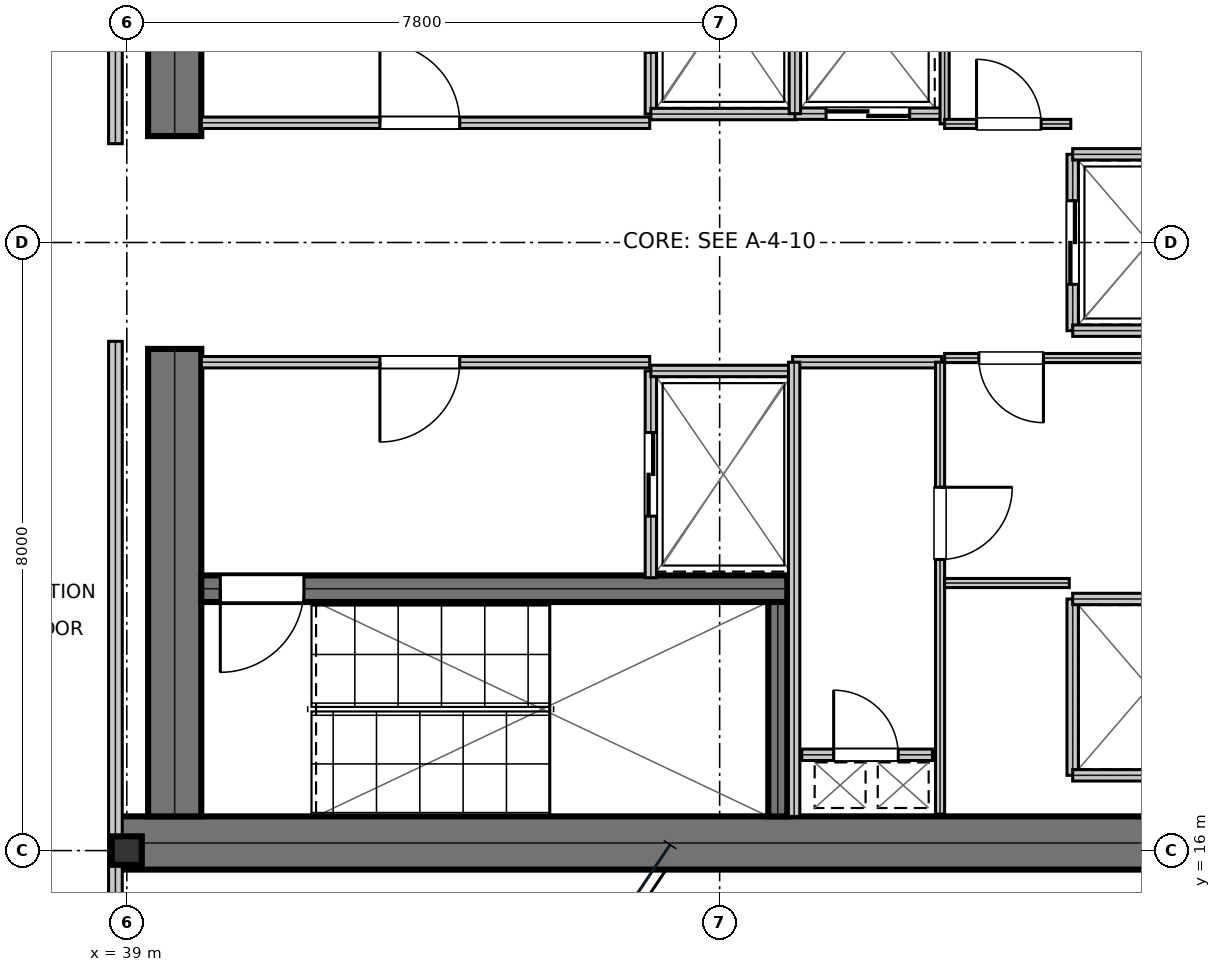
"""IFC4 building model, lengths in metres.
Left out: names, types, materials, properties, quantities, classifications, styles, units other than length and angle.
Written with IfcOpenShell. Run it as: python <this file> out.ifc"""

import sys

from ifc_helpers import new_model, si_unit, direction, frame, frame_2d, origin, origin_2d, place, context, subcontext, project, spatial, rectangle, i_section, extrude, element, fill, save


model = new_model("IFC4")
c1 = context("Model", 3, precision=1e-05, world=origin(), true_north=direction((0.0, 1.0)))
c2 = subcontext(c1, "Body", "Model", "MODEL_VIEW")
j1 = project(units=[si_unit("LENGTHUNIT", "METRE"), si_unit("PLANEANGLEUNIT", "RADIAN")], contexts=[c1])
p1 = place(None, origin())
s1 = spatial("IfcSite", under=j1, at=p1, CompositionType="ELEMENT")
p2 = place(p1, origin())
s2 = spatial("IfcBuilding", under=s1, at=p2, CompositionType="ELEMENT")
p3 = place(p2, frame((0.0, 0.0, 208.05)))
s3 = spatial("IfcBuildingStorey", under=s2, at=p3, CompositionType="ELEMENT", Elevation=208.05)
p4 = place(p3, frame((38.8, 16.1, 0.0), z_axis=(0.0, 0.0, 1.0), x_axis=(1.0, 0.0, 0.0)))
e1 = element("IfcWall", 1, at=p4, inside=s3, PredefinedType="SHEAR", context=c2, shape_type="SweptSolid", body=[
    extrude(rectangle(XDim=16.0, YDim=0.7, at=frame_2d((8.0, 0.0))), origin(), (0.0, 0.0, 1.0), 3.79),
])
for number, where, z_axis, x_axis in (
    (2, (39.63, 16.45, 0.0), (0.0, 0.0, 1.0), (0.0, 1.0, 0.0)),
    (3, (39.63, 25.4, 0.0), (0.0, 0.0, 1.0), (0.0, 1.0, 0.0)),
):
    element("IfcWall", number, at=place(p3, frame(where, z_axis=z_axis, x_axis=x_axis)), inside=s3, PredefinedType="SHEAR", context=c2, shape_type="SweptSolid", body=[
        extrude(rectangle(XDim=6.15, YDim=0.7, at=frame_2d((3.075, 0.0))), origin(), (0.0, 0.0, 1.0), 3.79),
    ])
p5 = place(p3, frame((39.98, 19.445, 0.0), z_axis=(0.0, 0.0, 1.0), x_axis=(1.0, 0.0, 0.0)))
e4 = element("IfcWall", 4, at=p5, inside=s3, PredefinedType="SHEAR", context=c2, shape_type="SweptSolid", body=[
    extrude(rectangle(XDim=7.71, YDim=0.35, at=frame_2d((3.855, 0.0))), origin(), (0.0, 0.0, 1.0), 3.79),
])
p6 = place(p5, frame((0.25, 0.0, 0.0)))
e5 = element("IfcOpeningElement", 5, at=p6, cuts=e4, PredefinedType="OPENING", context=c2, shape_type="SweptSolid", body=[
    extrude(rectangle(XDim=1.1, YDim=2.15, at=frame_2d((0.55, 1.075))), frame((0.0, 0.185, 0.0), z_axis=(0.0, -1.0, 0.0), x_axis=(1.0, 0.0, 0.0)), (0.0, 0.0, 1.0), 0.37),
])
p7 = place(p3, frame((47.565, 16.45, 0.0), z_axis=(0.0, 0.0, 1.0), x_axis=(0.0, 1.0, 0.0)))
e6 = element("IfcWall", 6, at=p7, inside=s3, PredefinedType="SHEAR", context=c2, shape_type="SweptSolid", body=[
    extrude(rectangle(XDim=2.82, YDim=0.25, at=frame_2d((1.41, 0.0))), origin(), (0.0, 0.0, 1.0), 3.79),
])
p8 = place(p3, frame((39.0, 16.0, 0.0), z_axis=(0.0, 0.0, 1.0), x_axis=(1.0, 0.0, 0.0)))
e7 = element("IfcColumn", 7, at=p8, inside=s3, PredefinedType="COLUMN", context=c2, shape_type="SweptSolid", body=[
    extrude(i_section(OverallWidth=0.394, OverallDepth=0.375, WebThickness=0.017, FlangeThickness=0.028, at=origin_2d()), origin(), (0.0, 0.0, 1.0), 4.044),
])
p9 = place(p3, frame((39.98, 25.575, 0.0), z_axis=(0.0, 0.0, 1.0), x_axis=(1.0, 0.0, 0.0)))
e8 = element("IfcWall", 8, at=p9, inside=s3, PredefinedType="PARTITIONING", context=c2, shape_type="SweptSolid", body=[
    extrude(rectangle(XDim=5.9, YDim=0.15, at=frame_2d((2.95, 0.0))), origin(), (0.0, 0.0, 1.0), 3.79),
])
p10 = place(p9, frame((2.35, 0.0, 0.0)))
e9 = element("IfcOpeningElement", 9, at=p10, cuts=e8, PredefinedType="OPENING", context=c2, shape_type="SweptSolid", body=[
    extrude(rectangle(XDim=1.05, YDim=2.15, at=frame_2d((0.525, 1.075))), frame((0.0, 0.085, 0.0), z_axis=(0.0, -1.0, 0.0), x_axis=(1.0, 0.0, 0.0)), (0.0, 0.0, 1.0), 0.17),
])
p11 = place(p3, frame((39.98, 22.425, 0.0), z_axis=(0.0, 0.0, 1.0), x_axis=(1.0, 0.0, 0.0)))
e10 = element("IfcWall", 10, at=p11, inside=s3, PredefinedType="PARTITIONING", context=c2, shape_type="SweptSolid", body=[
    extrude(rectangle(XDim=5.9, YDim=0.15, at=frame_2d((2.95, 0.0))), origin(), (0.0, 0.0, 1.0), 3.79),
])
p12 = place(p11, frame((2.35, 0.0, 0.0)))
e11 = element("IfcOpeningElement", 11, at=p12, cuts=e10, PredefinedType="OPENING", context=c2, shape_type="SweptSolid", body=[
    extrude(rectangle(XDim=1.05, YDim=2.15, at=frame_2d((0.525, 1.075))), frame((0.0, 0.085, 0.0), z_axis=(0.0, -1.0, 0.0), x_axis=(1.0, 0.0, 0.0)), (0.0, 0.0, 1.0), 0.17),
])
p13 = place(p3, frame((45.895, 25.69, 0.0), z_axis=(0.0, 0.0, 1.0), x_axis=(0.0, 1.0, 0.0)))
e12 = element("IfcWall", 12, at=p13, inside=s3, PredefinedType="PARTITIONING", context=c2, shape_type="SweptSolid", body=[
    extrude(rectangle(XDim=2.72, YDim=0.15, at=frame_2d((1.36, 0.0))), origin(), (0.0, 0.0, 1.0), 3.79),
])
p14 = place(p13, frame((0.81, 0.0, 0.0)))
e13 = element("IfcOpeningElement", 13, at=p14, cuts=e12, PredefinedType="OPENING", context=c2, shape_type="SweptSolid", body=[
    extrude(rectangle(XDim=1.1, YDim=2.15, at=frame_2d((0.55, 1.075))), frame((0.0, 0.085, 0.0), z_axis=(0.0, -1.0, 0.0), x_axis=(1.0, 0.0, 0.0)), (0.0, 0.0, 1.0), 0.17),
])
p15 = place(p3, frame((45.895, 25.69, 0.0), z_axis=(0.0, 0.0, 1.0), x_axis=(1.0, 0.0, 0.0)))
e14 = element("IfcWall", 14, at=p15, inside=s3, PredefinedType="PARTITIONING", context=c2, shape_type="SweptSolid", body=[
    extrude(rectangle(XDim=1.915, YDim=0.15, at=frame_2d((0.958, 0.0))), origin(), (0.0, 0.0, 1.0), 3.79),
])
p16 = place(p3, frame((45.895, 19.59, 0.0), z_axis=(0.0, 0.0, 1.0), x_axis=(0.0, 1.0, 0.0)))
e15 = element("IfcWall", 15, at=p16, inside=s3, PredefinedType="PARTITIONING", context=c2, shape_type="SweptSolid", body=[
    extrude(rectangle(XDim=2.72, YDim=0.15, at=frame_2d((1.36, 0.0))), origin(), (0.0, 0.0, 1.0), 3.79),
])
p17 = place(p16, frame((0.81, 0.0, 0.0)))
e16 = element("IfcOpeningElement", 16, at=p17, cuts=e15, PredefinedType="OPENING", context=c2, shape_type="SweptSolid", body=[
    extrude(rectangle(XDim=1.1, YDim=2.15, at=frame_2d((0.55, 1.075))), frame((0.0, 0.085, 0.0), z_axis=(0.0, -1.0, 0.0), x_axis=(1.0, 0.0, 0.0)), (0.0, 0.0, 1.0), 0.17),
])
p18 = place(p3, frame((45.895, 22.31, 0.0), z_axis=(0.0, 0.0, 1.0), x_axis=(1.0, 0.0, 0.0)))
e17 = element("IfcWall", 17, at=p18, inside=s3, PredefinedType="PARTITIONING", context=c2, shape_type="SweptSolid", body=[
    extrude(rectangle(XDim=1.915, YDim=0.15, at=frame_2d((0.958, 0.0))), origin(), (0.0, 0.0, 1.0), 3.79),
])
p19 = place(p3, frame((47.79, 25.695, 0.0), z_axis=(0.0, 0.0, 1.0), x_axis=(1.0, 0.0, 0.0)))
e18 = element("IfcWall", 18, at=p19, inside=s3, PredefinedType="PARTITIONING", context=c2, shape_type="SweptSolid", body=[
    extrude(rectangle(XDim=1.92, YDim=0.15, at=frame_2d((0.96, 0.0))), origin(), (0.0, 0.0, 1.0), 3.79),
])
p20 = place(p19, frame((0.41, 0.0, 0.0)))
e19 = element("IfcOpeningElement", 19, at=p20, cuts=e18, PredefinedType="OPENING", context=c2, shape_type="SweptSolid", body=[
    extrude(rectangle(XDim=1.1, YDim=2.15, at=frame_2d((0.55, 1.075))), frame((0.0, 0.085, 0.0), z_axis=(0.0, -1.0, 0.0), x_axis=(1.0, 0.0, 0.0)), (0.0, 0.0, 1.0), 0.17),
])
p21 = place(p3, frame((47.79, 25.695, 0.0), z_axis=(0.0, 0.0, 1.0), x_axis=(0.0, 1.0, 0.0)))
e20 = element("IfcWall", 20, at=p21, inside=s3, PredefinedType="PARTITIONING", context=c2, shape_type="SweptSolid", body=[
    extrude(rectangle(XDim=2.415, YDim=0.15, at=frame_2d((1.208, 0.0))), origin(), (0.0, 0.0, 1.0), 3.79),
])
p22 = place(p3, frame((51.445, 22.84, 0.0), z_axis=(0.0, 0.0, 1.0), x_axis=(0.0, 1.0, 0.0)))
e21 = element("IfcWall", 21, at=p22, inside=s3, PredefinedType="PARTITIONING", context=c2, shape_type="SweptSolid", body=[
    extrude(rectangle(XDim=2.32, YDim=0.15, at=frame_2d((1.16, 0.0))), origin(), (0.0, 0.0, 1.0), 3.79),
])
p23 = place(p22, frame((0.61, 0.0, 0.0)))
e22 = element("IfcOpeningElement", 22, at=p23, cuts=e21, PredefinedType="OPENING", context=c2, shape_type="SweptSolid", body=[
    extrude(rectangle(XDim=1.1, YDim=2.15, at=frame_2d((0.55, 1.075))), frame((0.0, 0.085, 0.0), z_axis=(0.0, -1.0, 0.0), x_axis=(1.0, 0.0, 0.0)), (0.0, 0.0, 1.0), 0.17),
])
for number, where, z_axis, x_axis in (
    (23, (51.445, 22.84, 0.0), (0.0, 0.0, 1.0), (1.0, 0.0, 0.0)),
    (24, (51.445, 25.16, 0.0), (0.0, 0.0, 1.0), (1.0, 0.0, 0.0)),
):
    element("IfcWall", number, at=place(p3, frame(where, z_axis=z_axis, x_axis=x_axis)), inside=s3, PredefinedType="PARTITIONING", context=c2, shape_type="SweptSolid", body=[
        extrude(rectangle(XDim=2.015, YDim=0.15, at=frame_2d((1.007, 0.0))), origin(), (0.0, 0.0, 1.0), 3.79),
    ])
p24 = place(p3, frame((51.445, 16.99, 0.0), z_axis=(0.0, 0.0, 1.0), x_axis=(0.0, 1.0, 0.0)))
e25 = element("IfcWall", 25, at=p24, inside=s3, PredefinedType="PARTITIONING", context=c2, shape_type="SweptSolid", body=[
    extrude(rectangle(XDim=2.32, YDim=0.15, at=frame_2d((1.16, 0.0))), origin(), (0.0, 0.0, 1.0), 3.79),
])
for number, where, z_axis, x_axis in (
    (26, (51.445, 16.99, 0.0), (0.0, 0.0, 1.0), (1.0, 0.0, 0.0)),
    (27, (51.445, 19.31, 0.0), (0.0, 0.0, 1.0), (1.0, 0.0, 0.0)),
):
    element("IfcWall", number, at=place(p3, frame(where, z_axis=z_axis, x_axis=x_axis)), inside=s3, PredefinedType="PARTITIONING", context=c2, shape_type="SweptSolid", body=[
        extrude(rectangle(XDim=2.015, YDim=0.15, at=frame_2d((1.007, 0.0))), origin(), (0.0, 0.0, 1.0), 3.79),
    ])
p25 = place(p3, frame((47.88, 17.26, 0.0), z_axis=(0.0, 0.0, 1.0), x_axis=(1.0, 0.0, 0.0)))
e28 = element("IfcWall", 28, at=p25, inside=s3, PredefinedType="PARTITIONING", context=c2, shape_type="SweptSolid", body=[
    extrude(rectangle(XDim=1.72, YDim=0.15, at=frame_2d((0.86, 0.0))), origin(), (0.0, 0.0, 1.0), 3.79),
])
p26 = place(p25, frame((0.42, 0.0, 0.0)))
e29 = element("IfcOpeningElement", 29, at=p26, cuts=e28, PredefinedType="OPENING", context=c2, shape_type="SweptSolid", body=[
    extrude(rectangle(XDim=0.85, YDim=2.15, at=frame_2d((0.425, 1.075))), frame((0.0, 0.085, 0.0), z_axis=(0.0, -1.0, 0.0), x_axis=(1.0, 0.0, 0.0)), (0.0, 0.0, 1.0), 0.17),
])
p27 = place(p3, frame((47.76, 22.425, 0.0), z_axis=(0.0, 0.0, 1.0), x_axis=(1.0, 0.0, 0.0)))
e30 = element("IfcWall", 30, at=p27, inside=s3, PredefinedType="PARTITIONING", context=c2, shape_type="SweptSolid", body=[
    extrude(rectangle(XDim=1.96, YDim=0.15, at=frame_2d((0.98, 0.0))), origin(), (0.0, 0.0, 1.0), 3.79),
])
p28 = place(p3, frame((47.78, 16.45, 0.0), z_axis=(0.0, 0.0, 1.0), x_axis=(0.0, 1.0, 0.0)))
e31 = element("IfcWall", 31, at=p28, inside=s3, PredefinedType="PARTITIONING", context=c2, shape_type="SweptSolid", body=[
    extrude(rectangle(XDim=5.975, YDim=0.15, at=frame_2d((2.988, 0.0))), origin(), (0.0, 0.0, 1.0), 3.79),
])
p29 = place(p3, frame((49.7, 16.48, 0.0), z_axis=(0.0, 0.0, 1.0), x_axis=(0.0, 1.0, 0.0)))
e32 = element("IfcWall", 32, at=p29, inside=s3, PredefinedType="PARTITIONING", context=c2, shape_type="SweptSolid", body=[
    extrude(rectangle(XDim=5.945, YDim=0.12, at=frame_2d((2.973, 0.0))), origin(), (0.0, 0.0, 1.0), 3.79),
])
p30 = place(p29, frame((3.35, 0.0, 0.0)))
e33 = element("IfcOpeningElement", 33, at=p30, cuts=e32, PredefinedType="OPENING", context=c2, shape_type="SweptSolid", body=[
    extrude(rectangle(XDim=0.95, YDim=2.15, at=frame_2d((0.475, 1.075))), frame((0.0, 0.07, 0.0), z_axis=(0.0, -1.0, 0.0), x_axis=(1.0, 0.0, 0.0)), (0.0, 0.0, 1.0), 0.14),
])
p31 = place(p3, frame((49.76, 22.48, 0.0), z_axis=(0.0, 0.0, 1.0), x_axis=(1.0, 0.0, 0.0)))
e34 = element("IfcWall", 34, at=p31, inside=s3, PredefinedType="PARTITIONING", context=c2, shape_type="SweptSolid", body=[
    extrude(rectangle(XDim=3.9, YDim=0.12, at=frame_2d((1.95, 0.0))), origin(), (0.0, 0.0, 1.0), 3.79),
])
p32 = place(p31, frame((0.45, 0.0, 0.0)))
e35 = element("IfcOpeningElement", 35, at=p32, cuts=e34, PredefinedType="OPENING", context=c2, shape_type="SweptSolid", body=[
    extrude(rectangle(XDim=0.85, YDim=2.15, at=frame_2d((0.425, 1.075))), frame((0.0, 0.07, 0.0), z_axis=(0.0, -1.0, 0.0), x_axis=(1.0, 0.0, 0.0)), (0.0, 0.0, 1.0), 0.14),
])
p33 = place(p3, frame((49.76, 19.52, 0.0), z_axis=(0.0, 0.0, 1.0), x_axis=(1.0, 0.0, 0.0)))
e36 = element("IfcWall", 36, at=p33, inside=s3, PredefinedType="PARTITIONING", context=c2, shape_type="SweptSolid", body=[
    extrude(rectangle(XDim=1.64, YDim=0.12, at=frame_2d((0.82, 0.0))), origin(), (0.0, 0.0, 1.0), 3.79),
])
p34 = place(p3, frame((49.76, 25.56, 0.0), z_axis=(0.0, 0.0, 1.0), x_axis=(0.0, 1.0, 0.0)))
e37 = element("IfcWall", 37, at=p34, inside=s3, PredefinedType="PARTITIONING", context=c2, shape_type="SweptSolid", body=[
    extrude(rectangle(XDim=2.66, YDim=0.12, at=frame_2d((1.33, 0.0))), origin(), (0.0, 0.0, 1.0), 3.79),
])
p35 = place(p3, frame((49.76, 25.56, 0.0), z_axis=(0.0, 0.0, 1.0), x_axis=(1.0, 0.0, 0.0)))
e38 = element("IfcWall", 38, at=p35, inside=s3, PredefinedType="PARTITIONING", context=c2, shape_type="SweptSolid", body=[
    extrude(rectangle(XDim=1.66, YDim=0.12, at=frame_2d((0.83, 0.0))), origin(), (0.0, 0.0, 1.0), 3.79),
])
p36 = place(p35, frame((0.42, 0.0, 0.0)))
e39 = element("IfcOpeningElement", 39, at=p36, cuts=e38, PredefinedType="OPENING", context=c2, shape_type="SweptSolid", body=[
    extrude(rectangle(XDim=0.85, YDim=2.15, at=frame_2d((0.425, 1.075))), frame((0.0, 0.07, 0.0), z_axis=(0.0, -1.0, 0.0), x_axis=(1.0, 0.0, 0.0)), (0.0, 0.0, 1.0), 0.14),
])
p37 = place(p3, frame((38.85, 14.5, 0.0), z_axis=(0.0, 0.0, 1.0), x_axis=(0.0, 1.0, 0.0)))
e40 = element("IfcWall", 40, at=p37, inside=s3, PredefinedType="SOLIDWALL", context=c2, shape_type="SweptSolid", body=[
    extrude(rectangle(XDim=8.2, YDim=0.18, at=frame_2d((4.1, 0.0))), origin(), (0.0, 0.0, 1.0), 3.241),
])
p38 = place(p3, frame((38.85, 25.3, 0.0), z_axis=(0.0, 0.0, 1.0), x_axis=(0.0, 1.0, 0.0)))
e41 = element("IfcWall", 41, at=p38, inside=s3, PredefinedType="SOLIDWALL", context=c2, shape_type="SweptSolid", body=[
    extrude(rectangle(XDim=8.198, YDim=0.18, at=frame_2d((4.099, 0.0))), origin(), (0.0, 0.0, 1.0), 3.241),
])
p39 = place(p10, origin())
e42 = element("IfcDoor", 42, at=p39, inside=s3, OperationType="SINGLE_SWING_LEFT", PredefinedType="DOOR", context=c2, shape_type="SweptSolid", body=[
    extrude(rectangle(XDim=1.05, YDim=2.15, at=frame_2d((0.525, 1.075))), frame((0.0, 0.025, 0.0), z_axis=(0.0, -1.0, 0.0), x_axis=(1.0, 0.0, 0.0)), (0.0, 0.0, 1.0), 0.05),
])
fill(e9, e42)
p40 = place(p12, frame((1.05, 0.0, 0.0), z_axis=(0.0, 0.0, 1.0), x_axis=(-1.0, 0.0, 0.0)))
e43 = element("IfcDoor", 43, at=p40, inside=s3, OperationType="SINGLE_SWING_RIGHT", PredefinedType="DOOR", context=c2, shape_type="SweptSolid", body=[
    extrude(rectangle(XDim=1.05, YDim=2.15, at=frame_2d((0.525, 1.075))), frame((0.0, 0.025, 0.0), z_axis=(0.0, -1.0, 0.0), x_axis=(1.0, 0.0, 0.0)), (0.0, 0.0, 1.0), 0.05),
])
fill(e11, e43)
p41 = place(p17, frame((1.1, 0.0, 0.0), z_axis=(0.0, 0.0, 1.0), x_axis=(-1.0, 0.0, 0.0)))
e44 = element("IfcDoor", 44, at=p41, inside=s3, OperationType="DOUBLE_DOOR_SLIDING", PredefinedType="DOOR", context=c2, shape_type="SweptSolid", body=[
    extrude(rectangle(XDim=1.1, YDim=2.15, at=frame_2d((0.55, 1.075))), frame((0.0, 0.025, 0.0), z_axis=(0.0, -1.0, 0.0), x_axis=(1.0, 0.0, 0.0)), (0.0, 0.0, 1.0), 0.05),
])
fill(e16, e44)
p42 = place(p20, frame((1.1, 0.0, 0.0), z_axis=(0.0, 0.0, 1.0), x_axis=(-1.0, 0.0, 0.0)))
e45 = element("IfcDoor", 45, at=p42, inside=s3, OperationType="DOUBLE_DOOR_SLIDING", PredefinedType="DOOR", context=c2, shape_type="SweptSolid", body=[
    extrude(rectangle(XDim=1.1, YDim=2.15, at=frame_2d((0.55, 1.075))), frame((0.0, 0.025, 0.0), z_axis=(0.0, -1.0, 0.0), x_axis=(1.0, 0.0, 0.0)), (0.0, 0.0, 1.0), 0.05),
])
fill(e19, e45)
p43 = place(p23, frame((1.1, 0.0, 0.0), z_axis=(0.0, 0.0, 1.0), x_axis=(-1.0, 0.0, 0.0)))
e46 = element("IfcDoor", 46, at=p43, inside=s3, OperationType="DOUBLE_DOOR_SLIDING", PredefinedType="DOOR", context=c2, shape_type="SweptSolid", body=[
    extrude(rectangle(XDim=1.1, YDim=2.15, at=frame_2d((0.55, 1.075))), frame((0.0, 0.025, 0.0), z_axis=(0.0, -1.0, 0.0), x_axis=(1.0, 0.0, 0.0)), (0.0, 0.0, 1.0), 0.05),
])
fill(e22, e46)
p44 = place(p26, origin())
e47 = element("IfcDoor", 47, at=p44, inside=s3, OperationType="SINGLE_SWING_LEFT", PredefinedType="TRAPDOOR", context=c2, shape_type="SweptSolid", body=[
    extrude(rectangle(XDim=0.85, YDim=2.15, at=frame_2d((0.425, 1.075))), frame((0.0, 0.025, 0.0), z_axis=(0.0, -1.0, 0.0), x_axis=(1.0, 0.0, 0.0)), (0.0, 0.0, 1.0), 0.05),
])
fill(e29, e47)
p45 = place(p30, frame((0.95, 0.0, 0.0), z_axis=(0.0, 0.0, 1.0), x_axis=(-1.0, 0.0, 0.0)))
e48 = element("IfcDoor", 48, at=p45, inside=s3, OperationType="SINGLE_SWING_LEFT", PredefinedType="DOOR", context=c2, shape_type="SweptSolid", body=[
    extrude(rectangle(XDim=0.95, YDim=2.15, at=frame_2d((0.475, 1.075))), frame((0.0, 0.025, 0.0), z_axis=(0.0, -1.0, 0.0), x_axis=(1.0, 0.0, 0.0)), (0.0, 0.0, 1.0), 0.05),
])
fill(e33, e48)
p46 = place(p32, frame((0.85, 0.0, 0.0), z_axis=(0.0, 0.0, 1.0), x_axis=(-1.0, 0.0, 0.0)))
e49 = element("IfcDoor", 49, at=p46, inside=s3, OperationType="SINGLE_SWING_LEFT", PredefinedType="DOOR", context=c2, shape_type="SweptSolid", body=[
    extrude(rectangle(XDim=0.85, YDim=2.15, at=frame_2d((0.425, 1.075))), frame((0.0, 0.025, 0.0), z_axis=(0.0, -1.0, 0.0), x_axis=(1.0, 0.0, 0.0)), (0.0, 0.0, 1.0), 0.05),
])
fill(e35, e49)
p47 = place(p36, origin())
e50 = element("IfcDoor", 50, at=p47, inside=s3, OperationType="SINGLE_SWING_LEFT", PredefinedType="DOOR", context=c2, shape_type="SweptSolid", body=[
    extrude(rectangle(XDim=0.85, YDim=2.15, at=frame_2d((0.425, 1.075))), frame((0.0, 0.025, 0.0), z_axis=(0.0, -1.0, 0.0), x_axis=(1.0, 0.0, 0.0)), (0.0, 0.0, 1.0), 0.05),
])
fill(e39, e50)
p48 = place(p6, frame((1.1, 0.0, 0.0), z_axis=(0.0, 0.0, 1.0), x_axis=(-1.0, 0.0, 0.0)))
e51 = element("IfcDoor", 51, at=p48, inside=s3, OperationType="SINGLE_SWING_RIGHT", PredefinedType="DOOR", context=c2, shape_type="SweptSolid", body=[
    extrude(rectangle(XDim=1.1, YDim=2.15, at=frame_2d((0.55, 1.075))), frame((0.0, 0.025, 0.0), z_axis=(0.0, -1.0, 0.0), x_axis=(1.0, 0.0, 0.0)), (0.0, 0.0, 1.0), 0.05),
])
fill(e5, e51)
save(model, sys.argv[1])
